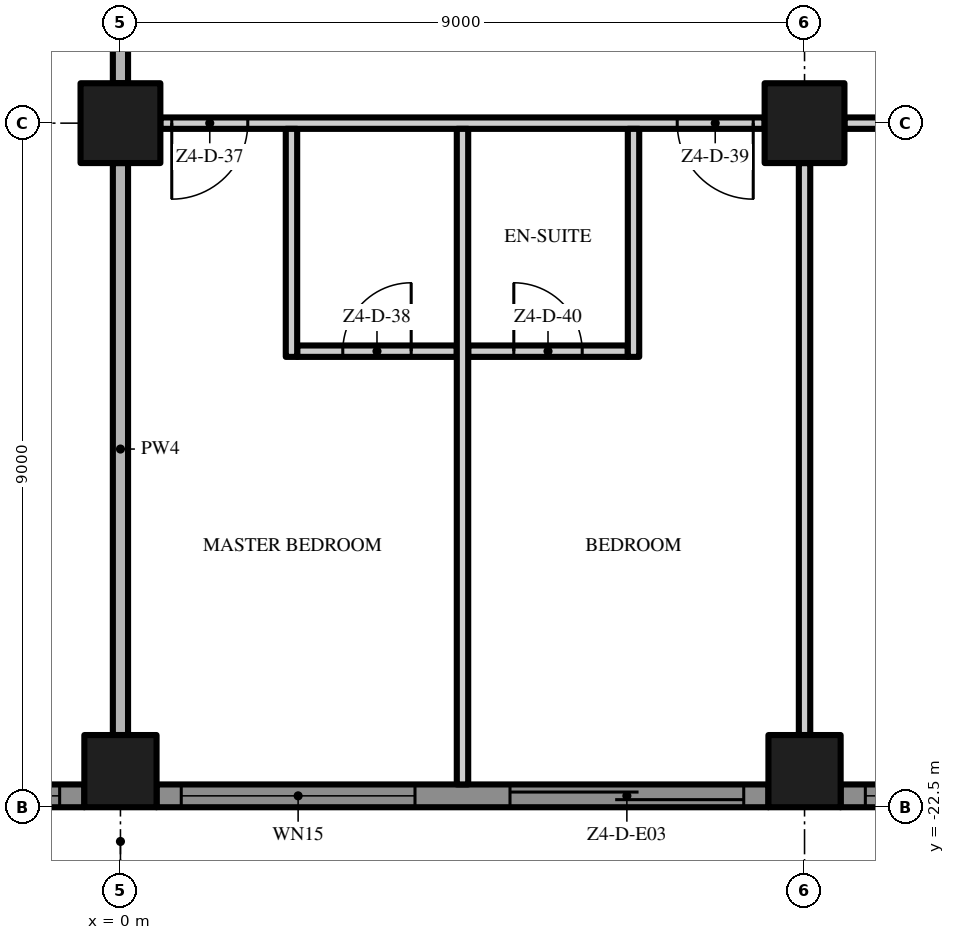
"""IFC4 building model, lengths in metres.
Left out: names, types, materials, properties, quantities, classifications, styles, units other than length and angle.
Written with IfcOpenShell. Run it as: python <this file> out.ifc"""

import sys

from ifc_helpers import new_model, si_unit, direction, frame, frame_2d, origin, origin_2d, place, context, subcontext, project, spatial, polyline, rectangle, outline, extrude, element, fill, save


model = new_model("IFC4")
c1 = context("Model", 3, precision=1e-05, world=origin(), true_north=direction((0.0, 1.0)))
c2 = subcontext(c1, "Body", "Model", "MODEL_VIEW")
j1 = project(units=[si_unit("LENGTHUNIT", "METRE"), si_unit("PLANEANGLEUNIT", "RADIAN")], contexts=[c1])
p1 = place(None, origin())
s1 = spatial("IfcSite", under=j1, at=p1, CompositionType="ELEMENT")
p2 = place(p1, origin())
s2 = spatial("IfcBuilding", under=s1, at=p2, CompositionType="ELEMENT")
p3 = place(p2, frame((0.0, 0.0, 222.4)))
s3 = spatial("IfcBuildingStorey", under=s2, at=p3, CompositionType="ELEMENT", Elevation=222.4)
p4 = place(p3, frame((0.0, -13.5, 0.0), z_axis=(0.0, 0.0, 1.0), x_axis=(1.0, 0.0, 0.0)))
e1 = element("IfcColumn", 1, at=p4, inside=s3, PredefinedType="COLUMN", context=c2, shape_type="SweptSolid", body=[
    extrude(rectangle(XDim=1.05, YDim=1.05, at=origin_2d()), origin(), (0.0, 0.0, 1.0), 3.5),
])
p5 = place(p3, frame((0.0, -22.025, 0.0), z_axis=(0.0, 0.0, 1.0), x_axis=(1.0, 0.0, 0.0)))
e2 = element("IfcColumn", 2, at=p5, inside=s3, PredefinedType="COLUMN", context=c2, shape_type="SweptSolid", body=[
    extrude(rectangle(XDim=0.95, YDim=0.95, at=origin_2d()), origin(), (0.0, 0.0, 1.0), 3.5),
])
p6 = place(p3, frame((9.0, -13.5, 0.0), z_axis=(0.0, 0.0, 1.0), x_axis=(1.0, 0.0, 0.0)))
e3 = element("IfcColumn", 3, at=p6, inside=s3, PredefinedType="COLUMN", context=c2, shape_type="SweptSolid", body=[
    extrude(rectangle(XDim=1.05, YDim=1.05, at=origin_2d()), origin(), (0.0, 0.0, 1.0), 3.5),
])
p7 = place(p3, frame((9.0, -22.025, 0.0), z_axis=(0.0, 0.0, 1.0), x_axis=(1.0, 0.0, 0.0)))
e4 = element("IfcColumn", 4, at=p7, inside=s3, PredefinedType="COLUMN", context=c2, shape_type="SweptSolid", body=[
    extrude(rectangle(XDim=0.95, YDim=0.95, at=origin_2d()), origin(), (0.0, 0.0, 1.0), 3.5),
])
p8 = place(p3, frame((-0.475, -22.35, 0.0), z_axis=(0.0, 0.0, 1.0), x_axis=(-1.0, 0.0, 0.0)))
e5 = element("IfcWall", 5, at=p8, inside=s3, PredefinedType="SOLIDWALL", context=c2, shape_type="SweptSolid", body=[
    extrude(rectangle(XDim=8.05, YDim=0.3, at=frame_2d((4.025, 0.0))), origin(), (0.0, 0.0, 1.0), 3.5),
])
p9 = place(p8, frame((4.65, 0.0, 0.0)))
e6 = element("IfcOpeningElement", 6, at=p9, cuts=e5, PredefinedType="OPENING", context=c2, shape_type="SweptSolid", body=[
    extrude(rectangle(XDim=3.075, YDim=2.4, at=frame_2d((1.538, 1.2))), frame((0.0, 0.16, 0.0), z_axis=(0.0, -1.0, 0.0), x_axis=(1.0, 0.0, 0.0)), (0.0, 0.0, 1.0), 0.32),
])
p10 = place(p8, frame((0.325, 0.0, 0.45)))
e7 = element("IfcOpeningElement", 7, at=p10, cuts=e5, PredefinedType="OPENING", context=c2, shape_type="SweptSolid", body=[
    extrude(rectangle(XDim=3.075, YDim=2.65, at=frame_2d((1.538, 1.325))), frame((0.0, 0.16, 0.0), z_axis=(0.0, -1.0, 0.0), x_axis=(1.0, 0.0, 0.0)), (0.0, 0.0, 1.0), 0.32),
])
p11 = place(p3, frame((8.525, -22.35, 0.0), z_axis=(0.0, 0.0, 1.0), x_axis=(-1.0, 0.0, 0.0)))
e8 = element("IfcWall", 8, at=p11, inside=s3, PredefinedType="SOLIDWALL", context=c2, shape_type="SweptSolid", body=[
    extrude(rectangle(XDim=8.05, YDim=0.3, at=frame_2d((4.025, 0.0))), origin(), (0.0, 0.0, 1.0), 3.5),
])
p12 = place(p11, frame((4.65, 0.0, 0.45)))
e9 = element("IfcOpeningElement", 9, at=p12, cuts=e8, PredefinedType="OPENING", context=c2, shape_type="SweptSolid", body=[
    extrude(rectangle(XDim=3.075, YDim=2.65, at=frame_2d((1.538, 1.325))), frame((0.0, 0.16, 0.0), z_axis=(0.0, -1.0, 0.0), x_axis=(1.0, 0.0, 0.0)), (0.0, 0.0, 1.0), 0.32),
])
p13 = place(p11, frame((0.325, 0.0, 0.0)))
e10 = element("IfcOpeningElement", 10, at=p13, cuts=e8, PredefinedType="OPENING", context=c2, shape_type="SweptSolid", body=[
    extrude(rectangle(XDim=3.075, YDim=2.4, at=frame_2d((1.538, 1.2))), frame((0.0, 0.16, 0.0), z_axis=(0.0, -1.0, 0.0), x_axis=(1.0, 0.0, 0.0)), (0.0, 0.0, 1.0), 0.32),
])
p14 = place(p3, frame((17.525, -22.35, 0.0), z_axis=(0.0, 0.0, 1.0), x_axis=(-1.0, 0.0, 0.0)))
e11 = element("IfcWall", 11, at=p14, inside=s3, PredefinedType="SOLIDWALL", context=c2, shape_type="SweptSolid", body=[
    extrude(rectangle(XDim=8.05, YDim=0.3, at=frame_2d((4.025, 0.0))), origin(), (0.0, 0.0, 1.0), 3.5),
])
p15 = place(p14, frame((4.65, 0.0, 0.45)))
e12 = element("IfcOpeningElement", 12, at=p15, cuts=e11, PredefinedType="OPENING", context=c2, shape_type="SweptSolid", body=[
    extrude(rectangle(XDim=3.075, YDim=2.65, at=frame_2d((1.538, 1.325))), frame((0.0, 0.16, 0.0), z_axis=(0.0, -1.0, 0.0), x_axis=(1.0, 0.0, 0.0)), (0.0, 0.0, 1.0), 0.32),
])
p16 = place(p14, frame((0.325, 0.0, 0.45)))
e13 = element("IfcOpeningElement", 13, at=p16, cuts=e11, PredefinedType="OPENING", context=c2, shape_type="SweptSolid", body=[
    extrude(rectangle(XDim=3.075, YDim=2.65, at=frame_2d((1.538, 1.325))), frame((0.0, 0.16, 0.0), z_axis=(0.0, -1.0, 0.0), x_axis=(1.0, 0.0, 0.0)), (0.0, 0.0, 1.0), 0.32),
])
p17 = place(p3, origin())
e14 = element("IfcWall", 14, at=p17, inside=s3, PredefinedType="USERDEFINED", context=c2, shape_type="SweptSolid", body=[
    extrude(outline(polyline([(-22.5, -25.149), (-21.0, -24.488), (-19.5, -23.755), (-18.0, -23.231), (-16.875, -23.1), (-16.5, -23.115), (-15.0, -23.451), (-13.5, -24.112), (-12.0, -24.845), (-10.5, -25.369), (-9.375, -25.5), (-9.0, -25.485), (-7.5, -25.149), (-6.0, -24.488), (-4.5, -23.755), (-3.0, -23.231), (-1.875, -23.1), (-1.5, -23.115), (0.0, -23.451), (1.5, -24.112), (3.0, -24.845), (4.5, -25.369), (5.625, -25.5), (6.0, -25.485), (7.5, -25.149), (9.0, -24.488), (10.5, -23.755), (12.0, -23.231), (13.125, -23.1), (13.5, -23.115), (15.0, -23.451), (16.5, -24.112), (18.0, -24.845), (19.5, -25.369), (20.625, -25.5), (21.0, -25.485), (22.5, -25.149), (22.445, -24.905), (20.967, -25.236), (20.635, -25.249), (19.556, -25.124), (18.096, -24.614), (16.605, -23.885), (15.079, -23.213), (13.533, -22.866), (13.115, -22.849), (11.944, -22.986), (10.404, -23.524), (8.895, -24.261), (7.421, -24.91), (5.967, -25.236), (5.635, -25.249), (4.556, -25.124), (3.096, -24.614), (1.605, -23.885), (0.079, -23.213), (-1.467, -22.866), (-1.885, -22.849), (-3.056, -22.986), (-4.596, -23.524), (-6.105, -24.261), (-7.579, -24.91), (-9.033, -25.236), (-9.365, -25.249), (-10.444, -25.124), (-11.904, -24.614), (-13.395, -23.885), (-14.921, -23.213), (-16.467, -22.866), (-16.885, -22.849), (-18.056, -22.986), (-19.596, -23.524), (-21.105, -24.261), (-22.601, -24.92), (-22.5, -25.149)])), origin(), (0.0, 0.0, 1.0), 0.9),
])
p18 = place(p3, frame((2.325, -16.5, 0.0), z_axis=(0.0, 0.0, 1.0), x_axis=(1.0, 0.0, 0.0)))
e15 = element("IfcWall", 15, at=p18, inside=s3, PredefinedType="PARTITIONING", context=c2, shape_type="SweptSolid", body=[
    extrude(rectangle(XDim=2.1, YDim=0.15, at=frame_2d((1.05, 0.0))), origin(), (0.0, 0.0, 1.0), 3.5),
])
p19 = place(p18, frame((0.6, 0.0, 0.0)))
e16 = element("IfcOpeningElement", 16, at=p19, cuts=e15, PredefinedType="OPENING", context=c2, shape_type="SweptSolid", body=[
    extrude(rectangle(XDim=0.9, YDim=2.1, at=frame_2d((0.45, 1.05))), frame((0.0, 0.085, 0.0), z_axis=(0.0, -1.0, 0.0), x_axis=(1.0, 0.0, 0.0)), (0.0, 0.0, 1.0), 0.17),
])
p20 = place(p3, frame((4.575, -16.5, 0.0), z_axis=(0.0, 0.0, 1.0), x_axis=(1.0, 0.0, 0.0)))
e17 = element("IfcWall", 17, at=p20, inside=s3, PredefinedType="PARTITIONING", context=c2, shape_type="SweptSolid", body=[
    extrude(rectangle(XDim=2.1, YDim=0.15, at=frame_2d((1.05, 0.0))), origin(), (0.0, 0.0, 1.0), 3.5),
])
p21 = place(p20, frame((0.6, 0.0, 0.0)))
e18 = element("IfcOpeningElement", 18, at=p21, cuts=e17, PredefinedType="OPENING", context=c2, shape_type="SweptSolid", body=[
    extrude(rectangle(XDim=0.9, YDim=2.1, at=frame_2d((0.45, 1.05))), frame((0.0, 0.085, 0.0), z_axis=(0.0, -1.0, 0.0), x_axis=(1.0, 0.0, 0.0)), (0.0, 0.0, 1.0), 0.17),
])
p22 = place(p3, frame((8.475, -13.5, 0.0), z_axis=(0.0, 0.0, 1.0), x_axis=(-1.0, 0.0, 0.0)))
e19 = element("IfcWall", 19, at=p22, inside=s3, PredefinedType="PARTITIONING", context=c2, shape_type="SweptSolid", body=[
    extrude(rectangle(XDim=7.95, YDim=0.15, at=frame_2d((3.975, 0.0))), origin(), (0.0, 0.0, 1.0), 3.5),
])
p23 = place(p22, frame((6.8, 0.0, 0.0)))
e20 = element("IfcOpeningElement", 20, at=p23, cuts=e19, PredefinedType="OPENING", context=c2, shape_type="SweptSolid", body=[
    extrude(rectangle(XDim=1.0, YDim=2.4, at=frame_2d((0.5, 1.2))), frame((0.0, 0.085, 0.0), z_axis=(0.0, -1.0, 0.0), x_axis=(1.0, 0.0, 0.0)), (0.0, 0.0, 1.0), 0.17),
])
p24 = place(p22, frame((0.15, 0.0, 0.0)))
e21 = element("IfcOpeningElement", 21, at=p24, cuts=e19, PredefinedType="OPENING", context=c2, shape_type="SweptSolid", body=[
    extrude(rectangle(XDim=1.0, YDim=2.4, at=frame_2d((0.5, 1.2))), frame((0.0, 0.085, 0.0), z_axis=(0.0, -1.0, 0.0), x_axis=(1.0, 0.0, 0.0)), (0.0, 0.0, 1.0), 0.17),
])
p25 = place(p3, frame((17.475, -13.5, 0.0), z_axis=(0.0, 0.0, 1.0), x_axis=(-1.0, 0.0, 0.0)))
e22 = element("IfcWall", 22, at=p25, inside=s3, PredefinedType="PARTITIONING", context=c2, shape_type="SweptSolid", body=[
    extrude(rectangle(XDim=7.95, YDim=0.15, at=frame_2d((3.975, 0.0))), origin(), (0.0, 0.0, 1.0), 3.5),
])
p26 = place(p25, frame((5.5, 0.0, 0.0)))
e23 = element("IfcOpeningElement", 23, at=p26, cuts=e22, PredefinedType="OPENING", context=c2, shape_type="SweptSolid", body=[
    extrude(rectangle(XDim=1.5, YDim=2.4, at=frame_2d((0.75, 1.2))), frame((0.0, 0.085, 0.0), z_axis=(0.0, -1.0, 0.0), x_axis=(1.0, 0.0, 0.0)), (0.0, 0.0, 1.0), 0.17),
])
p27 = place(p3, frame((0.0, -21.55, 0.0), z_axis=(0.0, 0.0, 1.0), x_axis=(0.0, 1.0, 0.0)))
e24 = element("IfcWall", 24, at=p27, inside=s3, PredefinedType="PARTITIONING", context=c2, shape_type="SweptSolid", body=[
    extrude(rectangle(XDim=7.525, YDim=0.2, at=frame_2d((3.763, 0.0))), origin(), (0.0, 0.0, 1.0), 3.5),
])
p28 = place(p3, frame((0.0, -12.975, 0.0), z_axis=(0.0, 0.0, 1.0), x_axis=(0.0, 1.0, 0.0)))
e25 = element("IfcWall", 25, at=p28, inside=s3, PredefinedType="PARTITIONING", context=c2, shape_type="SweptSolid", body=[
    extrude(rectangle(XDim=7.95, YDim=0.2, at=frame_2d((3.975, 0.0))), origin(), (0.0, 0.0, 1.0), 3.5),
])
p29 = place(p3, frame((2.25, -16.575, 0.0), z_axis=(0.0, 0.0, 1.0), x_axis=(0.0, 1.0, 0.0)))
e26 = element("IfcWall", 26, at=p29, inside=s3, PredefinedType="PARTITIONING", context=c2, shape_type="SweptSolid", body=[
    extrude(rectangle(XDim=3.0, YDim=0.15, at=frame_2d((1.5, 0.0))), origin(), (0.0, 0.0, 1.0), 3.5),
])
p30 = place(p3, frame((4.5, -22.2, 0.0), z_axis=(0.0, 0.0, 1.0), x_axis=(0.0, 1.0, 0.0)))
e27 = element("IfcWall", 27, at=p30, inside=s3, PredefinedType="PARTITIONING", context=c2, shape_type="SweptSolid", body=[
    extrude(rectangle(XDim=8.625, YDim=0.15, at=frame_2d((4.312, 0.0))), origin(), (0.0, 0.0, 1.0), 3.5),
])
p31 = place(p3, frame((6.75, -16.575, 0.0), z_axis=(0.0, 0.0, 1.0), x_axis=(0.0, 1.0, 0.0)))
e28 = element("IfcWall", 28, at=p31, inside=s3, PredefinedType="PARTITIONING", context=c2, shape_type="SweptSolid", body=[
    extrude(rectangle(XDim=3.0, YDim=0.15, at=frame_2d((1.5, 0.0))), origin(), (0.0, 0.0, 1.0), 3.5),
])
p32 = place(p3, frame((9.0, -21.55, 0.0), z_axis=(0.0, 0.0, 1.0), x_axis=(0.0, 1.0, 0.0)))
e29 = element("IfcWall", 29, at=p32, inside=s3, PredefinedType="PARTITIONING", context=c2, shape_type="SweptSolid", body=[
    extrude(rectangle(XDim=7.525, YDim=0.15, at=frame_2d((3.763, 0.0))), origin(), (0.0, 0.0, 1.0), 3.5),
])
p33 = place(p10, origin())
e30 = element("IfcWindow", 30, at=p33, inside=s3, PartitioningType="SINGLE_PANEL", PredefinedType="WINDOW", context=c2, shape_type="SweptSolid", body=[
    extrude(rectangle(XDim=3.075, YDim=2.65, at=frame_2d((1.538, 1.325))), frame((0.0, 0.03, 0.0), z_axis=(0.0, -1.0, 0.0), x_axis=(1.0, 0.0, 0.0)), (0.0, 0.0, 1.0), 0.06),
])
fill(e7, e30)
p34 = place(p12, origin())
e31 = element("IfcWindow", 31, at=p34, inside=s3, PartitioningType="SINGLE_PANEL", PredefinedType="WINDOW", context=c2, shape_type="SweptSolid", body=[
    extrude(rectangle(XDim=3.075, YDim=2.65, at=frame_2d((1.538, 1.325))), frame((0.0, 0.03, 0.0), z_axis=(0.0, -1.0, 0.0), x_axis=(1.0, 0.0, 0.0)), (0.0, 0.0, 1.0), 0.06),
])
fill(e9, e31)
p35 = place(p13, origin())
e32 = element("IfcDoor", 32, at=p35, inside=s3, OperationType="SINGLE_SWING_LEFT", PredefinedType="DOOR", context=c2, shape_type="SweptSolid", body=[
    extrude(rectangle(XDim=3.075, YDim=2.4, at=frame_2d((1.538, 1.2))), frame((0.0, 0.025, 0.0), z_axis=(0.0, -1.0, 0.0), x_axis=(1.0, 0.0, 0.0)), (0.0, 0.0, 1.0), 0.05),
])
fill(e10, e32)
p36 = place(p15, origin())
e33 = element("IfcWindow", 33, at=p36, inside=s3, PartitioningType="SINGLE_PANEL", PredefinedType="WINDOW", context=c2, shape_type="SweptSolid", body=[
    extrude(rectangle(XDim=3.075, YDim=2.65, at=frame_2d((1.538, 1.325))), frame((0.0, 0.03, 0.0), z_axis=(0.0, -1.0, 0.0), x_axis=(1.0, 0.0, 0.0)), (0.0, 0.0, 1.0), 0.06),
])
fill(e12, e33)
p37 = place(p23, origin())
e34 = element("IfcDoor", 34, at=p37, inside=s3, OperationType="SINGLE_SWING_RIGHT", PredefinedType="DOOR", context=c2, shape_type="SweptSolid", body=[
    extrude(rectangle(XDim=1.0, YDim=2.4, at=frame_2d((0.5, 1.2))), frame((0.0, 0.025, 0.0), z_axis=(0.0, -1.0, 0.0), x_axis=(1.0, 0.0, 0.0)), (0.0, 0.0, 1.0), 0.05),
])
fill(e20, e34)
p38 = place(p19, origin())
e35 = element("IfcDoor", 35, at=p38, inside=s3, OperationType="SINGLE_SWING_RIGHT", PredefinedType="DOOR", context=c2, shape_type="SweptSolid", body=[
    extrude(rectangle(XDim=0.9, YDim=2.1, at=frame_2d((0.45, 1.05))), frame((0.0, 0.025, 0.0), z_axis=(0.0, -1.0, 0.0), x_axis=(1.0, 0.0, 0.0)), (0.0, 0.0, 1.0), 0.05),
])
fill(e16, e35)
p39 = place(p24, origin())
e36 = element("IfcDoor", 36, at=p39, inside=s3, OperationType="SINGLE_SWING_LEFT", PredefinedType="DOOR", context=c2, shape_type="SweptSolid", body=[
    extrude(rectangle(XDim=1.0, YDim=2.4, at=frame_2d((0.5, 1.2))), frame((0.0, 0.025, 0.0), z_axis=(0.0, -1.0, 0.0), x_axis=(1.0, 0.0, 0.0)), (0.0, 0.0, 1.0), 0.05),
])
fill(e21, e36)
p40 = place(p21, origin())
e37 = element("IfcDoor", 37, at=p40, inside=s3, OperationType="SINGLE_SWING_LEFT", PredefinedType="DOOR", context=c2, shape_type="SweptSolid", body=[
    extrude(rectangle(XDim=0.9, YDim=2.1, at=frame_2d((0.45, 1.05))), frame((0.0, 0.025, 0.0), z_axis=(0.0, -1.0, 0.0), x_axis=(1.0, 0.0, 0.0)), (0.0, 0.0, 1.0), 0.05),
])
fill(e18, e37)
save(model, sys.argv[1])
